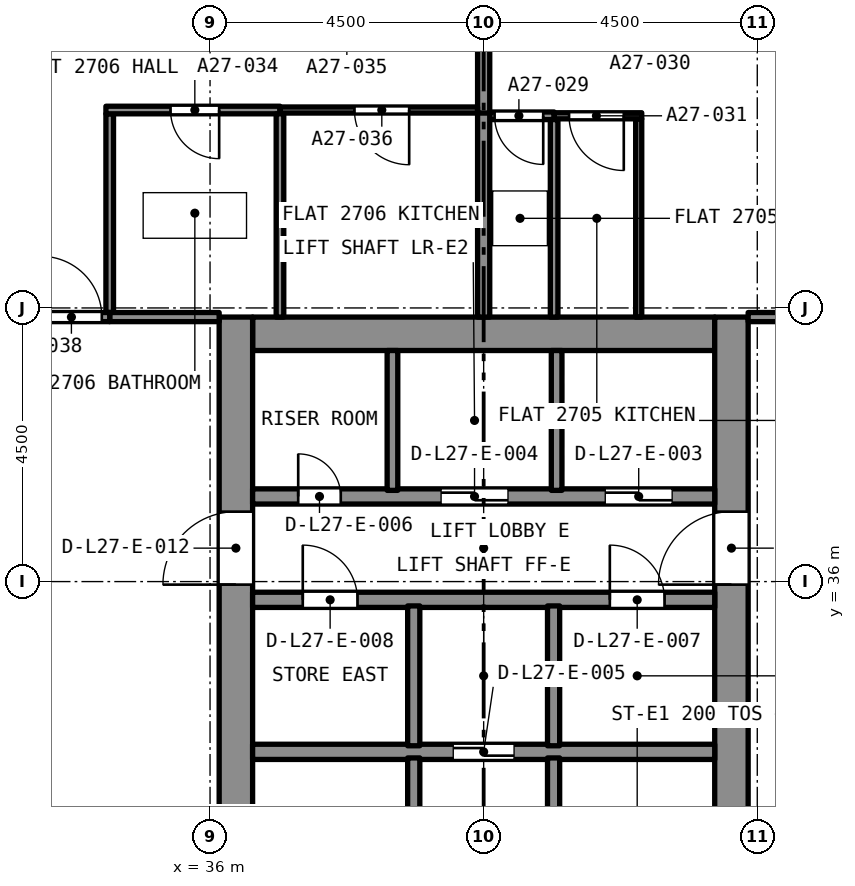
"""IFC4 building model, lengths in metres.
Left out: names, types, materials, properties, quantities, classifications, styles, units other than length and angle.
Written with IfcOpenShell. Run it as: python <this file> out.ifc"""

import sys

from ifc_helpers import new_model, si_unit, direction, frame, frame_2d, origin, place, context, subcontext, project, spatial, rectangle, extrude, element, fill, save


model = new_model("IFC4")
c1 = context("Model", 3, precision=1e-05, world=origin(), true_north=direction((0.0, 1.0)))
c2 = subcontext(c1, "Body", "Model", "MODEL_VIEW")
j1 = project(units=[si_unit("LENGTHUNIT", "METRE"), si_unit("PLANEANGLEUNIT", "RADIAN")], contexts=[c1])
p1 = place(None, origin())
s1 = spatial("IfcSite", under=j1, at=p1, CompositionType="ELEMENT")
p2 = place(p1, origin())
s2 = spatial("IfcBuilding", under=s1, at=p2, CompositionType="ELEMENT")
p3 = place(p2, frame((0.0, 0.0, 99.2)))
s3 = spatial("IfcBuildingStorey", under=s2, at=p3, CompositionType="ELEMENT", Elevation=99.2)
p4 = place(p3, frame((36.7, 40.075, 0.0), z_axis=(0.0, 0.0, 1.0), x_axis=(1.0, 0.0, 0.0)))
e1 = element("IfcWall", 1, at=p4, inside=s3, PredefinedType="SOLIDWALL", context=c2, shape_type="SweptSolid", body=[
    extrude(rectangle(XDim=7.6, YDim=0.55, at=frame_2d((3.8, 0.0))), origin(), (0.0, 0.0, 1.0), 3.2),
])
p5 = place(p3, frame((36.425, 27.15, 0.0), z_axis=(0.0, 0.0, 1.0), x_axis=(0.0, 1.0, 0.0)))
e2 = element("IfcWall", 2, at=p5, inside=s3, PredefinedType="SOLIDWALL", context=c2, shape_type="SweptSolid", body=[
    extrude(rectangle(XDim=13.2, YDim=0.55, at=frame_2d((6.6, 0.0))), origin(), (0.0, 0.0, 1.0), 3.2),
])
p6 = place(p5, frame((8.8, 0.0, 0.0)))
e3 = element("IfcOpeningElement", 3, at=p6, cuts=e2, PredefinedType="OPENING", context=c2, shape_type="SweptSolid", body=[
    extrude(rectangle(XDim=1.2, YDim=2.1, at=frame_2d((0.6, 1.05))), frame((0.0, 0.285, 0.0), z_axis=(0.0, -1.0, 0.0), x_axis=(1.0, 0.0, 0.0)), (0.0, 0.0, 1.0), 0.57),
])
p7 = place(p3, frame((44.575, 27.15, 0.0), z_axis=(0.0, 0.0, 1.0), x_axis=(0.0, 1.0, 0.0)))
e4 = element("IfcWall", 4, at=p7, inside=s3, PredefinedType="SOLIDWALL", context=c2, shape_type="SweptSolid", body=[
    extrude(rectangle(XDim=13.2, YDim=0.55, at=frame_2d((6.6, 0.0))), origin(), (0.0, 0.0, 1.0), 3.2),
])
p8 = place(p7, frame((8.8, 0.0, 0.0)))
e5 = element("IfcOpeningElement", 5, at=p8, cuts=e4, PredefinedType="OPENING", context=c2, shape_type="SweptSolid", body=[
    extrude(rectangle(XDim=1.2, YDim=2.1, at=frame_2d((0.6, 1.05))), frame((0.0, 0.285, 0.0), z_axis=(0.0, -1.0, 0.0), x_axis=(1.0, 0.0, 0.0)), (0.0, 0.0, 1.0), 0.57),
])
p9 = place(p3, frame((41.659, 43.66, 0.0), z_axis=(0.0, 0.0, 1.0), x_axis=(-1.0, 0.0, 0.0)))
e6 = element("IfcWall", 6, at=p9, inside=s3, PredefinedType="PARTITIONING", context=c2, shape_type="SweptSolid", body=[
    extrude(rectangle(XDim=1.059, YDim=0.125, at=frame_2d((0.53, 0.0))), origin(), (0.0, 0.0, 1.0), 2.9),
])
p10 = place(p9, frame((0.179, 0.0, 0.0)))
e7 = element("IfcOpeningElement", 7, at=p10, cuts=e6, PredefinedType="OPENING", context=c2, shape_type="SweptSolid", body=[
    extrude(rectangle(XDim=0.8, YDim=2.1, at=frame_2d((0.4, 1.05))), frame((0.0, 0.073, 0.0), z_axis=(0.0, -1.0, 0.0), x_axis=(1.0, 0.0, 0.0)), (0.0, 0.0, 1.0), 0.145),
])
p11 = place(p3, frame((41.659, 40.35, 0.0), z_axis=(0.0, 0.0, 1.0), x_axis=(0.0, 1.0, 0.0)))
e8 = element("IfcWall", 8, at=p11, inside=s3, PredefinedType="PARTITIONING", context=c2, shape_type="SweptSolid", body=[
    extrude(rectangle(XDim=3.247, YDim=0.125, at=frame_2d((1.624, 0.0))), origin(), (0.0, 0.0, 1.0), 2.9),
])
p12 = place(p3, frame((40.5, 40.35, 0.0), z_axis=(0.0, 0.0, 1.0), x_axis=(0.0, 1.0, 0.0)))
e9 = element("IfcWall", 9, at=p12, inside=s3, PredefinedType="PARTITIONING", context=c2, shape_type="SweptSolid", body=[
    extrude(rectangle(XDim=3.372, YDim=0.2, at=frame_2d((1.686, 0.0))), origin(), (0.0, 0.0, 1.0), 2.9),
])
p13 = place(p3, frame((43.05, 40.35, 0.0), z_axis=(0.0, 0.0, 1.0), x_axis=(0.0, 1.0, 0.0)))
e10 = element("IfcWall", 10, at=p13, inside=s3, PredefinedType="PARTITIONING", context=c2, shape_type="SweptSolid", body=[
    extrude(rectangle(XDim=3.26, YDim=0.1, at=frame_2d((1.63, 0.0))), origin(), (0.0, 0.0, 1.0), 2.9),
])
p14 = place(p3, frame((43.1, 43.66, 0.0), z_axis=(0.0, 0.0, 1.0), x_axis=(-1.0, 0.0, 0.0)))
e11 = element("IfcWall", 11, at=p14, inside=s3, PredefinedType="PARTITIONING", context=c2, shape_type="SweptSolid", body=[
    extrude(rectangle(XDim=1.441, YDim=0.1, at=frame_2d((0.72, 0.0))), origin(), (0.0, 0.0, 1.0), 2.9),
])
p15 = place(p14, frame((0.295, 0.0, 0.0)))
e12 = element("IfcOpeningElement", 12, at=p15, cuts=e11, PredefinedType="OPENING", context=c2, shape_type="SweptSolid", body=[
    extrude(rectangle(XDim=0.9, YDim=2.1, at=frame_2d((0.45, 1.05))), frame((0.0, 0.06, 0.0), z_axis=(0.0, -1.0, 0.0), x_axis=(1.0, 0.0, 0.0)), (0.0, 0.0, 1.0), 0.12),
])
p16 = place(p3, frame((40.5, 43.705, 0.0), z_axis=(0.0, 0.0, 1.0), x_axis=(0.0, 1.0, 0.0)))
e13 = element("IfcWall", 13, at=p16, inside=s3, PredefinedType="PARTITIONING", context=c2, shape_type="SweptSolid", body=[
    extrude(rectangle(XDim=1.345, YDim=0.2, at=frame_2d((0.672, 0.0))), origin(), (0.0, 0.0, 1.0), 2.9),
])
p17 = place(p3, frame((44.85, 40.35, 0.0), z_axis=(0.0, 0.0, 1.0), x_axis=(1.0, 0.0, 0.0)))
e14 = element("IfcWall", 14, at=p17, inside=s3, PredefinedType="PARTITIONING", context=c2, shape_type="SweptSolid", body=[
    extrude(rectangle(XDim=4.075, YDim=0.15, at=frame_2d((2.038, 0.0))), origin(), (0.0, 0.0, 1.0), 2.9),
])
p18 = place(p17, frame((1.9, 0.0, 0.0)))
e15 = element("IfcOpeningElement", 15, at=p18, cuts=e14, PredefinedType="OPENING", context=c2, shape_type="SweptSolid", body=[
    extrude(rectangle(XDim=1.0, YDim=2.1, at=frame_2d((0.5, 1.05))), frame((0.0, 0.085, 0.0), z_axis=(0.0, -1.0, 0.0), x_axis=(1.0, 0.0, 0.0)), (0.0, 0.0, 1.0), 0.17),
])
p19 = place(p3, frame((34.35, 40.425, 0.0), z_axis=(0.0, 0.0, 1.0), x_axis=(0.0, 1.0, 0.0)))
e16 = element("IfcWall", 16, at=p19, inside=s3, PredefinedType="PARTITIONING", context=c2, shape_type="SweptSolid", body=[
    extrude(rectangle(XDim=3.267, YDim=0.125, at=frame_2d((1.634, 0.0))), origin(), (0.0, 0.0, 1.0), 2.9),
])
p20 = place(p3, frame((37.15, 43.755, 0.0), z_axis=(0.0, 0.0, 1.0), x_axis=(-1.0, 0.0, 0.0)))
e17 = element("IfcWall", 17, at=p20, inside=s3, PredefinedType="PARTITIONING", context=c2, shape_type="SweptSolid", body=[
    extrude(rectangle(XDim=2.862, YDim=0.125, at=frame_2d((1.431, 0.0))), origin(), (0.0, 0.0, 1.0), 2.9),
])
p21 = place(p20, frame((1.0, 0.0, 0.0)))
e18 = element("IfcOpeningElement", 18, at=p21, cuts=e17, PredefinedType="OPENING", context=c2, shape_type="SweptSolid", body=[
    extrude(rectangle(XDim=0.8, YDim=2.1, at=frame_2d((0.4, 1.05))), frame((0.0, 0.073, 0.0), z_axis=(0.0, -1.0, 0.0), x_axis=(1.0, 0.0, 0.0)), (0.0, 0.0, 1.0), 0.145),
])
p22 = place(p3, frame((37.15, 40.35, 0.0), z_axis=(0.0, 0.0, 1.0), x_axis=(0.0, 1.0, 0.0)))
e19 = element("IfcWall", 19, at=p22, inside=s3, PredefinedType="PARTITIONING", context=c2, shape_type="SweptSolid", body=[
    extrude(rectangle(XDim=3.342, YDim=0.125, at=frame_2d((1.671, 0.0))), origin(), (0.0, 0.0, 1.0), 2.9),
])
p23 = place(p3, frame((34.35, 40.35, 0.0), z_axis=(0.0, 0.0, 1.0), x_axis=(1.0, 0.0, 0.0)))
e20 = element("IfcWall", 20, at=p23, inside=s3, PredefinedType="PARTITIONING", context=c2, shape_type="SweptSolid", body=[
    extrude(rectangle(XDim=1.8, YDim=0.15, at=frame_2d((0.9, 0.0))), origin(), (0.0, 0.0, 1.0), 2.9),
])
p24 = place(p3, frame((40.4, 43.755, 0.0), z_axis=(0.0, 0.0, 1.0), x_axis=(-1.0, 0.0, 0.0)))
e21 = element("IfcWall", 21, at=p24, inside=s3, PredefinedType="PARTITIONING", context=c2, shape_type="SweptSolid", body=[
    extrude(rectangle(XDim=3.25, YDim=0.1, at=frame_2d((1.625, 0.0))), origin(), (0.0, 0.0, 1.0), 2.9),
])
p25 = place(p24, frame((1.125, 0.0, 0.0)))
e22 = element("IfcOpeningElement", 22, at=p25, cuts=e21, PredefinedType="OPENING", context=c2, shape_type="SweptSolid", body=[
    extrude(rectangle(XDim=0.9, YDim=2.1, at=frame_2d((0.45, 1.05))), frame((0.0, 0.06, 0.0), z_axis=(0.0, -1.0, 0.0), x_axis=(1.0, 0.0, 0.0)), (0.0, 0.0, 1.0), 0.12),
])
p26 = place(p3, frame((32.075, 40.35, 0.0), z_axis=(0.0, 0.0, 1.0), x_axis=(1.0, 0.0, 0.0)))
e23 = element("IfcWall", 23, at=p26, inside=s3, PredefinedType="PARTITIONING", context=c2, shape_type="SweptSolid", body=[
    extrude(rectangle(XDim=2.275, YDim=0.15, at=frame_2d((1.138, 0.0))), origin(), (0.0, 0.0, 1.0), 2.9),
])
p27 = place(p26, frame((1.145, 0.0, 0.0)))
e24 = element("IfcOpeningElement", 24, at=p27, cuts=e23, PredefinedType="OPENING", context=c2, shape_type="SweptSolid", body=[
    extrude(rectangle(XDim=1.0, YDim=2.1, at=frame_2d((0.5, 1.05))), frame((0.0, 0.085, 0.0), z_axis=(0.0, -1.0, 0.0), x_axis=(1.0, 0.0, 0.0)), (0.0, 0.0, 1.0), 0.17),
])
p28 = place(p3, frame((36.7, 33.2, 0.0), z_axis=(0.0, 0.0, 1.0), x_axis=(1.0, 0.0, 0.0)))
e25 = element("IfcWall", 25, at=p28, inside=s3, PredefinedType="SOLIDWALL", context=c2, shape_type="SweptSolid", body=[
    extrude(rectangle(XDim=7.6, YDim=0.25, at=frame_2d((3.8, 0.0))), origin(), (0.0, 0.0, 1.0), 2.9),
])
p29 = place(p28, frame((3.3, 0.0, 0.0)))
e26 = element("IfcOpeningElement", 26, at=p29, cuts=e25, PredefinedType="OPENING", context=c2, shape_type="SweptSolid", body=[
    extrude(rectangle(XDim=1.0, YDim=2.1, at=frame_2d((0.5, 1.05))), frame((0.0, 0.135, 0.0), z_axis=(0.0, -1.0, 0.0), x_axis=(1.0, 0.0, 0.0)), (0.0, 0.0, 1.0), 0.27),
])
p30 = place(p3, frame((36.7, 35.7, 0.0), z_axis=(0.0, 0.0, 1.0), x_axis=(1.0, 0.0, 0.0)))
e27 = element("IfcWall", 27, at=p30, inside=s3, PredefinedType="SOLIDWALL", context=c2, shape_type="SweptSolid", body=[
    extrude(rectangle(XDim=7.6, YDim=0.25, at=frame_2d((3.8, 0.0))), origin(), (0.0, 0.0, 1.0), 2.9),
])
p31 = place(p30, frame((5.875, 0.0, 0.0)))
e28 = element("IfcOpeningElement", 28, at=p31, cuts=e27, PredefinedType="OPENING", context=c2, shape_type="SweptSolid", body=[
    extrude(rectangle(XDim=0.9, YDim=2.1, at=frame_2d((0.45, 1.05))), frame((0.0, 0.135, 0.0), z_axis=(0.0, -1.0, 0.0), x_axis=(1.0, 0.0, 0.0)), (0.0, 0.0, 1.0), 0.27),
])
p32 = place(p30, frame((0.825, 0.0, 0.0)))
e29 = element("IfcOpeningElement", 29, at=p32, cuts=e27, PredefinedType="OPENING", context=c2, shape_type="SweptSolid", body=[
    extrude(rectangle(XDim=0.9, YDim=2.1, at=frame_2d((0.45, 1.05))), frame((0.0, 0.135, 0.0), z_axis=(0.0, -1.0, 0.0), x_axis=(1.0, 0.0, 0.0)), (0.0, 0.0, 1.0), 0.27),
])
p33 = place(p3, frame((36.7, 37.4, 0.0), z_axis=(0.0, 0.0, 1.0), x_axis=(1.0, 0.0, 0.0)))
e30 = element("IfcWall", 30, at=p33, inside=s3, PredefinedType="SOLIDWALL", context=c2, shape_type="SweptSolid", body=[
    extrude(rectangle(XDim=7.6, YDim=0.25, at=frame_2d((3.8, 0.0))), origin(), (0.0, 0.0, 1.0), 2.9),
])
p34 = place(p33, frame((5.8, 0.0, 0.0)))
e31 = element("IfcOpeningElement", 31, at=p34, cuts=e30, PredefinedType="OPENING", context=c2, shape_type="SweptSolid", body=[
    extrude(rectangle(XDim=1.1, YDim=2.4, at=frame_2d((0.55, 1.2))), frame((0.0, 0.135, 0.0), z_axis=(0.0, -1.0, 0.0), x_axis=(1.0, 0.0, 0.0)), (0.0, 0.0, 1.0), 0.27),
])
p35 = place(p33, frame((3.1, 0.0, 0.0)))
e32 = element("IfcOpeningElement", 32, at=p35, cuts=e30, PredefinedType="OPENING", context=c2, shape_type="SweptSolid", body=[
    extrude(rectangle(XDim=1.1, YDim=2.4, at=frame_2d((0.55, 1.2))), frame((0.0, 0.135, 0.0), z_axis=(0.0, -1.0, 0.0), x_axis=(1.0, 0.0, 0.0)), (0.0, 0.0, 1.0), 0.27),
])
p36 = place(p33, frame((0.75, 0.0, 0.0)))
e33 = element("IfcOpeningElement", 33, at=p36, cuts=e30, PredefinedType="OPENING", context=c2, shape_type="SweptSolid", body=[
    extrude(rectangle(XDim=0.7, YDim=2.1, at=frame_2d((0.35, 1.05))), frame((0.0, 0.135, 0.0), z_axis=(0.0, -1.0, 0.0), x_axis=(1.0, 0.0, 0.0)), (0.0, 0.0, 1.0), 0.27),
])
p37 = place(p3, frame((41.65, 27.7, 0.0), z_axis=(0.0, 0.0, 1.0), x_axis=(0.0, 1.0, 0.0)))
e34 = element("IfcWall", 34, at=p37, inside=s3, PredefinedType="SOLIDWALL", context=c2, shape_type="SweptSolid", body=[
    extrude(rectangle(XDim=5.4, YDim=0.2, at=frame_2d((2.7, 0.0))), origin(), (0.0, 0.0, 1.0), 2.9),
])
p38 = place(p37, frame((0.2, 0.0, 0.0)))
e35 = element("IfcOpeningElement", 35, at=p38, cuts=e34, PredefinedType="OPENING", context=c2, shape_type="SweptSolid", body=[
    extrude(rectangle(XDim=0.9, YDim=2.1, at=frame_2d((0.45, 1.05))), frame((0.0, 0.11, 0.0), z_axis=(0.0, -1.0, 0.0), x_axis=(1.0, 0.0, 0.0)), (0.0, 0.0, 1.0), 0.22),
])
p39 = place(p3, frame((39.35, 27.7, 0.0), z_axis=(0.0, 0.0, 1.0), x_axis=(0.0, 1.0, 0.0)))
e36 = element("IfcWall", 36, at=p39, inside=s3, PredefinedType="SOLIDWALL", context=c2, shape_type="SweptSolid", body=[
    extrude(rectangle(XDim=5.4, YDim=0.2, at=frame_2d((2.7, 0.0))), origin(), (0.0, 0.0, 1.0), 2.9),
])
p40 = place(p39, frame((0.2, 0.0, 0.0)))
e37 = element("IfcOpeningElement", 37, at=p40, cuts=e36, PredefinedType="OPENING", context=c2, shape_type="SweptSolid", body=[
    extrude(rectangle(XDim=0.9, YDim=2.1, at=frame_2d((0.45, 1.05))), frame((0.0, 0.11, 0.0), z_axis=(0.0, -1.0, 0.0), x_axis=(1.0, 0.0, 0.0)), (0.0, 0.0, 1.0), 0.22),
])
for number, where, z_axis, x_axis in (
    (38, (41.65, 33.3, 0.0), (0.0, 0.0, 1.0), (0.0, 1.0, 0.0)),
    (39, (39.35, 33.3, 0.0), (0.0, 0.0, 1.0), (0.0, 1.0, 0.0)),
):
    element("IfcWall", number, at=place(p3, frame(where, z_axis=z_axis, x_axis=x_axis)), inside=s3, PredefinedType="SOLIDWALL", context=c2, shape_type="SweptSolid", body=[
        extrude(rectangle(XDim=2.3, YDim=0.2, at=frame_2d((1.15, 0.0))), origin(), (0.0, 0.0, 1.0), 2.9),
    ])
for number, where, z_axis, x_axis in (
    (40, (41.7, 37.5, 0.0), (0.0, 0.0, 1.0), (0.0, 1.0, 0.0)),
    (41, (39.0, 37.5, 0.0), (0.0, 0.0, 1.0), (0.0, 1.0, 0.0)),
):
    element("IfcWall", number, at=place(p3, frame(where, z_axis=z_axis, x_axis=x_axis)), inside=s3, PredefinedType="SOLIDWALL", context=c2, shape_type="SweptSolid", body=[
        extrude(rectangle(XDim=2.3, YDim=0.175, at=frame_2d((1.15, 0.0))), origin(), (0.0, 0.0, 1.0), 2.9),
    ])
p41 = place(p10, origin())
e42 = element("IfcDoor", 42, at=p41, inside=s3, OperationType="SINGLE_SWING_RIGHT", PredefinedType="DOOR", context=c2, shape_type="SweptSolid", body=[
    extrude(rectangle(XDim=0.8, YDim=2.1, at=frame_2d((0.4, 1.05))), frame((0.0, 0.025, 0.0), z_axis=(0.0, -1.0, 0.0), x_axis=(1.0, 0.0, 0.0)), (0.0, 0.0, 1.0), 0.05),
])
fill(e7, e42)
p42 = place(p15, origin())
e43 = element("IfcDoor", 43, at=p42, inside=s3, OperationType="SINGLE_SWING_RIGHT", PredefinedType="DOOR", context=c2, shape_type="SweptSolid", body=[
    extrude(rectangle(XDim=0.9, YDim=2.1, at=frame_2d((0.45, 1.05))), frame((0.0, 0.025, 0.0), z_axis=(0.0, -1.0, 0.0), x_axis=(1.0, 0.0, 0.0)), (0.0, 0.0, 1.0), 0.05),
])
fill(e12, e43)
p43 = place(p21, origin())
e44 = element("IfcDoor", 44, at=p43, inside=s3, OperationType="SINGLE_SWING_LEFT", PredefinedType="DOOR", context=c2, shape_type="SweptSolid", body=[
    extrude(rectangle(XDim=0.8, YDim=2.1, at=frame_2d((0.4, 1.05))), frame((0.0, 0.025, 0.0), z_axis=(0.0, -1.0, 0.0), x_axis=(1.0, 0.0, 0.0)), (0.0, 0.0, 1.0), 0.05),
])
fill(e18, e44)
p44 = place(p25, origin())
e45 = element("IfcDoor", 45, at=p44, inside=s3, OperationType="SINGLE_SWING_LEFT", PredefinedType="DOOR", context=c2, shape_type="SweptSolid", body=[
    extrude(rectangle(XDim=0.9, YDim=2.1, at=frame_2d((0.45, 1.05))), frame((0.0, 0.025, 0.0), z_axis=(0.0, -1.0, 0.0), x_axis=(1.0, 0.0, 0.0)), (0.0, 0.0, 1.0), 0.05),
])
fill(e22, e45)
p45 = place(p27, origin())
e46 = element("IfcDoor", 46, at=p45, inside=s3, OperationType="SINGLE_SWING_RIGHT", PredefinedType="DOOR", context=c2, shape_type="SweptSolid", body=[
    extrude(rectangle(XDim=1.0, YDim=2.1, at=frame_2d((0.5, 1.05))), frame((0.0, 0.025, 0.0), z_axis=(0.0, -1.0, 0.0), x_axis=(1.0, 0.0, 0.0)), (0.0, 0.0, 1.0), 0.05),
])
fill(e24, e46)
p46 = place(p34, origin())
e47 = element("IfcDoor", 47, at=p46, inside=s3, OperationType="SLIDING_TO_LEFT", PredefinedType="DOOR", context=c2, shape_type="SweptSolid", body=[
    extrude(rectangle(XDim=1.1, YDim=2.4, at=frame_2d((0.55, 1.2))), frame((0.0, 0.025, 0.0), z_axis=(0.0, -1.0, 0.0), x_axis=(1.0, 0.0, 0.0)), (0.0, 0.0, 1.0), 0.05),
])
fill(e31, e47)
p47 = place(p35, origin())
e48 = element("IfcDoor", 48, at=p47, inside=s3, OperationType="SLIDING_TO_LEFT", PredefinedType="DOOR", context=c2, shape_type="SweptSolid", body=[
    extrude(rectangle(XDim=1.1, YDim=2.4, at=frame_2d((0.55, 1.2))), frame((0.0, 0.025, 0.0), z_axis=(0.0, -1.0, 0.0), x_axis=(1.0, 0.0, 0.0)), (0.0, 0.0, 1.0), 0.05),
])
fill(e32, e48)
p48 = place(p29, origin())
e49 = element("IfcDoor", 49, at=p48, inside=s3, OperationType="SLIDING_TO_LEFT", PredefinedType="DOOR", context=c2, shape_type="SweptSolid", body=[
    extrude(rectangle(XDim=1.0, YDim=2.1, at=frame_2d((0.5, 1.05))), frame((0.0, 0.025, 0.0), z_axis=(0.0, -1.0, 0.0), x_axis=(1.0, 0.0, 0.0)), (0.0, 0.0, 1.0), 0.05),
])
fill(e26, e49)
p49 = place(p36, origin())
e50 = element("IfcDoor", 50, at=p49, inside=s3, OperationType="SINGLE_SWING_LEFT", PredefinedType="DOOR", context=c2, shape_type="SweptSolid", body=[
    extrude(rectangle(XDim=0.7, YDim=2.1, at=frame_2d((0.35, 1.05))), frame((0.0, 0.025, 0.0), z_axis=(0.0, -1.0, 0.0), x_axis=(1.0, 0.0, 0.0)), (0.0, 0.0, 1.0), 0.05),
])
fill(e33, e50)
p50 = place(p31, origin())
e51 = element("IfcDoor", 51, at=p50, inside=s3, OperationType="SINGLE_SWING_LEFT", PredefinedType="DOOR", context=c2, shape_type="SweptSolid", body=[
    extrude(rectangle(XDim=0.9, YDim=2.1, at=frame_2d((0.45, 1.05))), frame((0.0, 0.025, 0.0), z_axis=(0.0, -1.0, 0.0), x_axis=(1.0, 0.0, 0.0)), (0.0, 0.0, 1.0), 0.05),
])
fill(e28, e51)
p51 = place(p32, origin())
e52 = element("IfcDoor", 52, at=p51, inside=s3, OperationType="SINGLE_SWING_LEFT", PredefinedType="DOOR", context=c2, shape_type="SweptSolid", body=[
    extrude(rectangle(XDim=0.9, YDim=2.1, at=frame_2d((0.45, 1.05))), frame((0.0, 0.025, 0.0), z_axis=(0.0, -1.0, 0.0), x_axis=(1.0, 0.0, 0.0)), (0.0, 0.0, 1.0), 0.05),
])
fill(e29, e52)
p52 = place(p6, origin())
e53 = element("IfcDoor", 53, at=p52, inside=s3, OperationType="SINGLE_SWING_LEFT", PredefinedType="DOOR", context=c2, shape_type="SweptSolid", body=[
    extrude(rectangle(XDim=1.2, YDim=2.1, at=frame_2d((0.6, 1.05))), frame((0.0, 0.025, 0.0), z_axis=(0.0, -1.0, 0.0), x_axis=(1.0, 0.0, 0.0)), (0.0, 0.0, 1.0), 0.05),
])
fill(e3, e53)
p53 = place(p8, origin())
e54 = element("IfcDoor", 54, at=p53, inside=s3, OperationType="SINGLE_SWING_LEFT", PredefinedType="DOOR", context=c2, shape_type="SweptSolid", body=[
    extrude(rectangle(XDim=1.2, YDim=2.1, at=frame_2d((0.6, 1.05))), frame((0.0, 0.025, 0.0), z_axis=(0.0, -1.0, 0.0), x_axis=(1.0, 0.0, 0.0)), (0.0, 0.0, 1.0), 0.05),
])
fill(e5, e54)
save(model, sys.argv[1])
